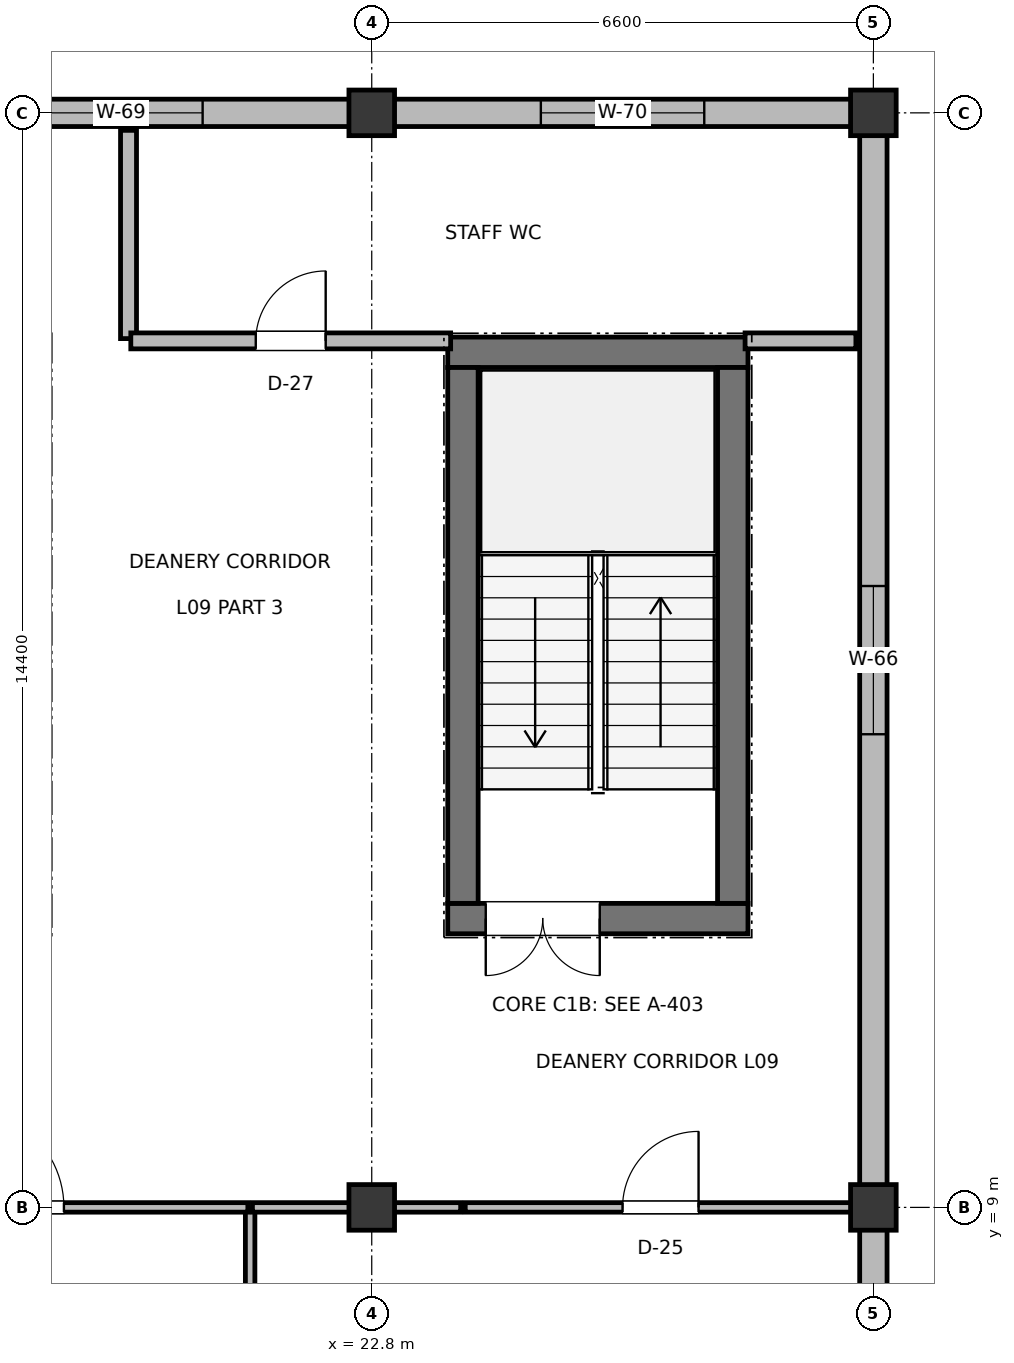
"""IFC4 building model, lengths in metres.
Left out: names, types, materials, properties, quantities, classifications, styles, units other than length and angle.
Written with IfcOpenShell. Run it as: python <this file> out.ifc"""

import sys

from ifc_helpers import new_model, si_unit, direction, frame, frame_2d, origin, origin_2d, place, context, subcontext, project, spatial, rectangle, extrude, element, fill, save


model = new_model("IFC4")
c1 = context("Model", 3, precision=1e-05, world=origin(), true_north=direction((0.0, 1.0)))
c2 = subcontext(c1, "Body", "Model", "MODEL_VIEW")
j1 = project(units=[si_unit("LENGTHUNIT", "METRE"), si_unit("PLANEANGLEUNIT", "RADIAN")], contexts=[c1])
p1 = place(None, origin())
s1 = spatial("IfcSite", under=j1, at=p1, CompositionType="ELEMENT")
p2 = place(p1, origin())
s2 = spatial("IfcBuilding", under=s1, at=p2, CompositionType="ELEMENT")
p3 = place(p2, frame((0.0, 0.0, 40.6)))
s3 = spatial("IfcBuildingStorey", under=s2, at=p3, CompositionType="ELEMENT", Elevation=40.6)
for number, where, z_axis, x_axis in (
    (1, (22.8, 9.0, 0.0), (0.0, 0.0, 1.0), (1.0, 0.0, 0.0)),
    (2, (22.8, 23.4, 0.0), (0.0, 0.0, 1.0), (1.0, 0.0, 0.0)),
    (3, (29.4, 9.0, 0.0), (0.0, 0.0, 1.0), (1.0, 0.0, 0.0)),
    (4, (29.4, 23.4, 0.0), (0.0, 0.0, 1.0), (1.0, 0.0, 0.0)),
):
    element("IfcColumn", number, at=place(p3, frame(where, z_axis=z_axis, x_axis=x_axis)), inside=s3, PredefinedType="COLUMN", context=c2, shape_type="SweptSolid", body=[
        extrude(rectangle(XDim=0.6, YDim=0.6, at=origin_2d()), origin(), (0.0, 0.0, 1.0), 4.0),
    ])
p4 = place(p3, frame((29.4, 3.285, 0.0), z_axis=(0.0, 0.0, 1.0), x_axis=(0.0, 1.0, 0.0)))
e5 = element("IfcWall", 5, at=p4, inside=s3, PredefinedType="SOLIDWALL", context=c2, shape_type="SweptSolid", body=[
    extrude(rectangle(XDim=5.43, YDim=0.36, at=frame_2d((2.715, 0.0))), origin(), (0.0, 0.0, 1.0), 3.095),
])
p5 = place(p4, frame((1.74, 0.0, 0.9)))
e6 = element("IfcOpeningElement", 6, at=p5, cuts=e5, PredefinedType="OPENING", context=c2, shape_type="SweptSolid", body=[
    extrude(rectangle(XDim=1.95, YDim=1.15, at=frame_2d((0.975, 0.575))), frame((0.0, 0.19, 0.0), z_axis=(0.0, -1.0, 0.0), x_axis=(1.0, 0.0, 0.0)), (0.0, 0.0, 1.0), 0.38),
])
p6 = place(p3, frame((29.4, 9.285, 0.0), z_axis=(0.0, 0.0, 1.0), x_axis=(0.0, 1.0, 0.0)))
e7 = element("IfcWall", 7, at=p6, inside=s3, PredefinedType="SOLIDWALL", context=c2, shape_type="SweptSolid", body=[
    extrude(rectangle(XDim=13.83, YDim=0.36, at=frame_2d((6.915, 0.0))), origin(), (0.0, 0.0, 1.0), 2.895),
])
p7 = place(p6, frame((5.94, 0.0, 0.9)))
e8 = element("IfcOpeningElement", 8, at=p7, cuts=e7, PredefinedType="OPENING", context=c2, shape_type="SweptSolid", body=[
    extrude(rectangle(XDim=1.95, YDim=1.35, at=frame_2d((0.975, 0.675))), frame((0.0, 0.19, 0.0), z_axis=(0.0, -1.0, 0.0), x_axis=(1.0, 0.0, 0.0)), (0.0, 0.0, 1.0), 0.38),
])
p8 = place(p3, frame((16.485, 23.4, 0.0), z_axis=(0.0, 0.0, 1.0), x_axis=(1.0, 0.0, 0.0)))
e9 = element("IfcWall", 9, at=p8, inside=s3, PredefinedType="SOLIDWALL", context=c2, shape_type="SweptSolid", body=[
    extrude(rectangle(XDim=6.03, YDim=0.36, at=frame_2d((3.015, 0.0))), origin(), (0.0, 0.0, 1.0), 2.825),
])
p9 = place(p8, frame((1.94, 0.0, 0.9)))
e10 = element("IfcOpeningElement", 10, at=p9, cuts=e9, PredefinedType="OPENING", context=c2, shape_type="SweptSolid", body=[
    extrude(rectangle(XDim=2.15, YDim=1.15, at=frame_2d((1.075, 0.575))), frame((0.0, 0.19, 0.0), z_axis=(0.0, -1.0, 0.0), x_axis=(1.0, 0.0, 0.0)), (0.0, 0.0, 1.0), 0.38),
])
p10 = place(p3, frame((23.085, 23.4, 0.0), z_axis=(0.0, 0.0, 1.0), x_axis=(1.0, 0.0, 0.0)))
e11 = element("IfcWall", 11, at=p10, inside=s3, PredefinedType="SOLIDWALL", context=c2, shape_type="SweptSolid", body=[
    extrude(rectangle(XDim=6.03, YDim=0.36, at=frame_2d((3.015, 0.0))), origin(), (0.0, 0.0, 1.0), 2.995),
])
p11 = place(p10, frame((1.94, 0.0, 0.9)))
e12 = element("IfcOpeningElement", 12, at=p11, cuts=e11, PredefinedType="OPENING", context=c2, shape_type="SweptSolid", body=[
    extrude(rectangle(XDim=2.15, YDim=1.35, at=frame_2d((1.075, 0.675))), frame((0.0, 0.19, 0.0), z_axis=(0.0, -1.0, 0.0), x_axis=(1.0, 0.0, 0.0)), (0.0, 0.0, 1.0), 0.38),
])
p12 = place(p3, frame((23.8, 12.8, 0.0), z_axis=(0.0, 0.0, 1.0), x_axis=(1.0, 0.0, 0.0)))
e13 = element("IfcWall", 13, at=p12, inside=s3, PredefinedType="SHEAR", context=c2, shape_type="SweptSolid", body=[
    extrude(rectangle(XDim=3.95, YDim=0.4, at=frame_2d((1.975, 0.0))), origin(), (0.0, 0.0, 1.0), 3.78),
])
p13 = place(p12, frame((0.5, 0.0, 0.0)))
e14 = element("IfcOpeningElement", 14, at=p13, cuts=e13, PredefinedType="OPENING", context=c2, shape_type="SweptSolid", body=[
    extrude(rectangle(XDim=1.5, YDim=2.2, at=frame_2d((0.75, 1.1))), frame((0.0, 0.21, 0.0), z_axis=(0.0, -1.0, 0.0), x_axis=(1.0, 0.0, 0.0)), (0.0, 0.0, 1.0), 0.42),
])
p14 = place(p3, frame((23.8, 20.25, 0.0), z_axis=(0.0, 0.0, 1.0), x_axis=(1.0, 0.0, 0.0)))
e15 = element("IfcWall", 15, at=p14, inside=s3, PredefinedType="SHEAR", context=c2, shape_type="SweptSolid", body=[
    extrude(rectangle(XDim=3.95, YDim=0.4, at=frame_2d((1.975, 0.0))), origin(), (0.0, 0.0, 1.0), 3.78),
])
for number, where, z_axis, x_axis in (
    (16, (24.0, 13.0, 0.0), (0.0, 0.0, 1.0), (0.0, 1.0, 0.0)),
    (17, (27.55, 13.0, 0.0), (0.0, 0.0, 1.0), (0.0, 1.0, 0.0)),
):
    element("IfcWall", number, at=place(p3, frame(where, z_axis=z_axis, x_axis=x_axis)), inside=s3, PredefinedType="SHEAR", context=c2, shape_type="SweptSolid", body=[
        extrude(rectangle(XDim=7.05, YDim=0.4, at=frame_2d((3.525, 0.0))), origin(), (0.0, 0.0, 1.0), 3.78),
    ])
p15 = place(p3, frame((21.2, 3.23, 0.0), z_axis=(0.0, 0.0, 1.0), x_axis=(0.0, 1.0, 0.0)))
e18 = element("IfcWall", 18, at=p15, inside=s3, PredefinedType="PARTITIONING", context=c2, shape_type="SweptSolid", body=[
    extrude(rectangle(XDim=5.74, YDim=0.125, at=frame_2d((2.87, 0.0))), origin(), (0.0, 0.0, 1.0), 2.885),
])
p16 = place(p3, frame((15.03, 9.0, 0.0), z_axis=(0.0, 0.0, 1.0), x_axis=(1.0, 0.0, 0.0)))
e19 = element("IfcWall", 19, at=p16, inside=s3, PredefinedType="PARTITIONING", context=c2, shape_type="SweptSolid", body=[
    extrude(rectangle(XDim=6.14, YDim=0.125, at=frame_2d((3.07, 0.0))), origin(), (0.0, 0.0, 1.0), 2.885),
])
p17 = place(p16, frame((2.42, 0.0, 0.0)))
e20 = element("IfcOpeningElement", 20, at=p17, cuts=e19, PredefinedType="OPENING", context=c2, shape_type="SweptSolid", body=[
    extrude(rectangle(XDim=1.3, YDim=2.2, at=frame_2d((0.65, 1.1))), frame((0.0, 0.073, 0.0), z_axis=(0.0, -1.0, 0.0), x_axis=(1.0, 0.0, 0.0)), (0.0, 0.0, 1.0), 0.145),
])
p18 = place(p3, frame((24.03, 9.0, 0.0), z_axis=(0.0, 0.0, 1.0), x_axis=(1.0, 0.0, 0.0)))
e21 = element("IfcWall", 21, at=p18, inside=s3, PredefinedType="PARTITIONING", context=c2, shape_type="SweptSolid", body=[
    extrude(rectangle(XDim=5.14, YDim=0.125, at=frame_2d((2.57, 0.0))), origin(), (0.0, 0.0, 1.0), 2.995),
])
p19 = place(p18, frame((2.07, 0.0, 0.0)))
e22 = element("IfcOpeningElement", 22, at=p19, cuts=e21, PredefinedType="OPENING", context=c2, shape_type="SweptSolid", body=[
    extrude(rectangle(XDim=1.0, YDim=2.15, at=frame_2d((0.5, 1.075))), frame((0.0, 0.073, 0.0), z_axis=(0.0, -1.0, 0.0), x_axis=(1.0, 0.0, 0.0)), (0.0, 0.0, 1.0), 0.145),
])
p20 = place(p3, frame((21.23, 9.0, 0.0), z_axis=(0.0, 0.0, 1.0), x_axis=(1.0, 0.0, 0.0)))
e23 = element("IfcWall", 23, at=p20, inside=s3, PredefinedType="PARTITIONING", context=c2, shape_type="SweptSolid", body=[
    extrude(rectangle(XDim=2.74, YDim=0.125, at=frame_2d((1.37, 0.0))), origin(), (0.0, 0.0, 1.0), 2.885),
])
p21 = place(p3, frame((27.712, 20.4, 0.0), z_axis=(0.0, 0.0, 1.0), x_axis=(1.0, 0.0, 0.0)))
e24 = element("IfcWall", 24, at=p21, inside=s3, PredefinedType="PLUMBINGWALL", context=c2, shape_type="SweptSolid", body=[
    extrude(rectangle(XDim=1.458, YDim=0.21, at=frame_2d((0.729, 0.0))), origin(), (0.0, 0.0, 1.0), 2.895),
])
p22 = place(p3, frame((19.6, 20.43, 0.0), z_axis=(0.0, 0.0, 1.0), x_axis=(0.0, 1.0, 0.0)))
e25 = element("IfcWall", 25, at=p22, inside=s3, PredefinedType="PLUMBINGWALL", context=c2, shape_type="SweptSolid", body=[
    extrude(rectangle(XDim=2.74, YDim=0.21, at=frame_2d((1.37, 0.0))), origin(), (0.0, 0.0, 1.0), 2.825),
])
p23 = place(p3, frame((19.63, 20.4, 0.0), z_axis=(0.0, 0.0, 1.0), x_axis=(1.0, 0.0, 0.0)))
e26 = element("IfcWall", 26, at=p23, inside=s3, PredefinedType="PLUMBINGWALL", context=c2, shape_type="SweptSolid", body=[
    extrude(rectangle(XDim=4.208, YDim=0.21, at=frame_2d((2.104, 0.0))), origin(), (0.0, 0.0, 1.0), 2.895),
])
p24 = place(p23, frame((1.644, 0.0, 0.0)))
e27 = element("IfcOpeningElement", 27, at=p24, cuts=e26, PredefinedType="OPENING", context=c2, shape_type="SweptSolid", body=[
    extrude(rectangle(XDim=0.92, YDim=2.1, at=frame_2d((0.46, 1.05))), frame((0.0, 0.115, 0.0), z_axis=(0.0, -1.0, 0.0), x_axis=(1.0, 0.0, 0.0)), (0.0, 0.0, 1.0), 0.23),
])
p25 = place(p7, frame((1.95, 0.0, 0.0), z_axis=(0.0, 0.0, 1.0), x_axis=(-1.0, 0.0, 0.0)))
e28 = element("IfcWindow", 28, at=p25, inside=s3, PartitioningType="DOUBLE_PANEL_VERTICAL", PredefinedType="WINDOW", context=c2, shape_type="SweptSolid", body=[
    extrude(rectangle(XDim=1.95, YDim=1.35, at=frame_2d((0.975, 0.675))), frame((0.0, 0.03, 0.0), z_axis=(0.0, -1.0, 0.0), x_axis=(1.0, 0.0, 0.0)), (0.0, 0.0, 1.0), 0.06),
])
fill(e8, e28)
p26 = place(p9, origin())
e29 = element("IfcWindow", 29, at=p26, inside=s3, PartitioningType="DOUBLE_PANEL_VERTICAL", PredefinedType="WINDOW", context=c2, shape_type="SweptSolid", body=[
    extrude(rectangle(XDim=2.15, YDim=1.15, at=frame_2d((1.075, 0.575))), frame((0.0, 0.03, 0.0), z_axis=(0.0, -1.0, 0.0), x_axis=(1.0, 0.0, 0.0)), (0.0, 0.0, 1.0), 0.06),
])
fill(e10, e29)
p27 = place(p11, origin())
e30 = element("IfcWindow", 30, at=p27, inside=s3, PartitioningType="DOUBLE_PANEL_VERTICAL", PredefinedType="WINDOW", context=c2, shape_type="SweptSolid", body=[
    extrude(rectangle(XDim=2.15, YDim=1.35, at=frame_2d((1.075, 0.675))), frame((0.0, 0.03, 0.0), z_axis=(0.0, -1.0, 0.0), x_axis=(1.0, 0.0, 0.0)), (0.0, 0.0, 1.0), 0.06),
])
fill(e12, e30)
p28 = place(p13, frame((1.5, 0.0, 0.0), z_axis=(0.0, 0.0, 1.0), x_axis=(-1.0, 0.0, 0.0)))
e31 = element("IfcDoor", 31, at=p28, inside=s3, OperationType="DOUBLE_DOOR_SINGLE_SWING", PredefinedType="DOOR", context=c2, shape_type="SweptSolid", body=[
    extrude(rectangle(XDim=1.5, YDim=2.2, at=frame_2d((0.75, 1.1))), frame((0.0, 0.025, 0.0), z_axis=(0.0, -1.0, 0.0), x_axis=(1.0, 0.0, 0.0)), (0.0, 0.0, 1.0), 0.05),
])
fill(e14, e31)
p29 = place(p17, origin())
e32 = element("IfcDoor", 32, at=p29, inside=s3, OperationType="SINGLE_SWING_LEFT", PredefinedType="DOOR", context=c2, shape_type="SweptSolid", body=[
    extrude(rectangle(XDim=1.3, YDim=2.2, at=frame_2d((0.65, 1.1))), frame((0.0, 0.025, 0.0), z_axis=(0.0, -1.0, 0.0), x_axis=(1.0, 0.0, 0.0)), (0.0, 0.0, 1.0), 0.05),
])
fill(e20, e32)
p30 = place(p19, origin())
e33 = element("IfcDoor", 33, at=p30, inside=s3, OperationType="SINGLE_SWING_RIGHT", PredefinedType="DOOR", context=c2, shape_type="SweptSolid", body=[
    extrude(rectangle(XDim=1.0, YDim=2.15, at=frame_2d((0.5, 1.075))), frame((0.0, 0.025, 0.0), z_axis=(0.0, -1.0, 0.0), x_axis=(1.0, 0.0, 0.0)), (0.0, 0.0, 1.0), 0.05),
])
fill(e22, e33)
p31 = place(p24, origin())
e34 = element("IfcDoor", 34, at=p31, inside=s3, OperationType="SINGLE_SWING_RIGHT", PredefinedType="DOOR", context=c2, shape_type="SweptSolid", body=[
    extrude(rectangle(XDim=0.92, YDim=2.1, at=frame_2d((0.46, 1.05))), frame((0.0, 0.025, 0.0), z_axis=(0.0, -1.0, 0.0), x_axis=(1.0, 0.0, 0.0)), (0.0, 0.0, 1.0), 0.05),
])
fill(e27, e34)
save(model, sys.argv[1])
